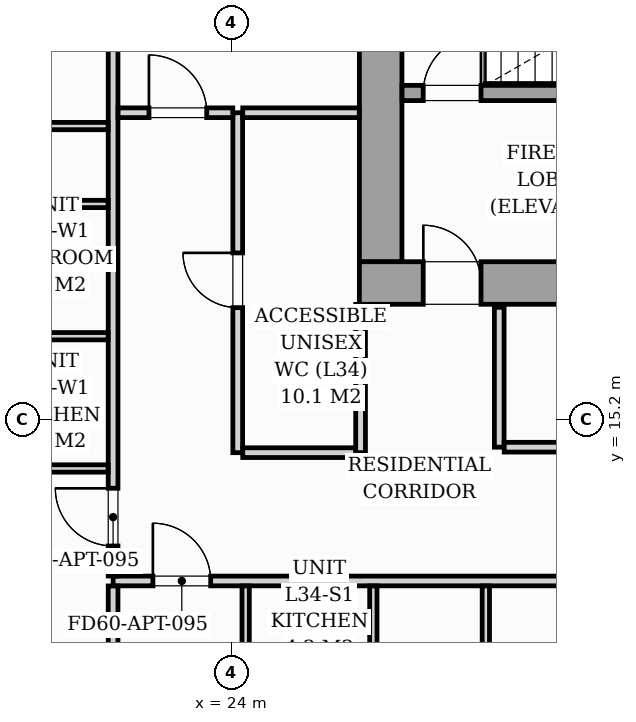
"""IFC4 building model, lengths in metres.
Left out: names, types, materials, properties, quantities, classifications, styles, units other than length and angle.
Written with IfcOpenShell. Run it as: python <this file> out.ifc"""

import sys

from ifc_helpers import new_model, si_unit, direction, frame, frame_2d, origin, origin_2d, place, context, subcontext, project, spatial, rectangle, i_section, extrude, source, transform, mapped, element, fill, save


model = new_model("IFC4")
c1 = context("Model", 3, precision=1e-05, world=origin(), true_north=direction((0.0, 1.0)))
c2 = subcontext(c1, "Body", "Model", "MODEL_VIEW")
j1 = project(units=[si_unit("LENGTHUNIT", "METRE"), si_unit("PLANEANGLEUNIT", "RADIAN")], contexts=[c1])
p1 = place(None, origin())
s1 = spatial("IfcSite", under=j1, at=p1, CompositionType="ELEMENT")
p2 = place(p1, origin())
s2 = spatial("IfcBuilding", under=s1, at=p2, CompositionType="ELEMENT")
p3 = place(p2, frame((0.0, 0.0, 119.4)))
s3 = spatial("IfcBuildingStorey", under=s2, at=p3, CompositionType="ELEMENT", Elevation=119.4)
m1 = source(origin(), c2, "Body", "SweptSolid", [
    extrude(i_section(OverallWidth=0.421, OverallDepth=0.465, WebThickness=0.045, FlangeThickness=0.073, FilletRadius=0.018, at=origin_2d()), origin(), (0.0, 0.0, 1.0), 5.196),
])
p4 = place(p3, frame((26.4, 17.4, 0.002), z_axis=(0.0, 0.0, 1.0), x_axis=(1.0, 0.0, 0.0)))
e1 = element("IfcColumn", 1, at=p4, inside=s3, PredefinedType="PILASTER", context=c2, shape_type="MappedRepresentation", body=[
    mapped(m1, transform((0.0, 0.0, 0.0), scale=1.0)),
])
p5 = place(p3, frame((26.1, 17.45, 0.0), z_axis=(0.0, 0.0, 1.0), x_axis=(1.0, 0.0, 0.0)))
e2 = element("IfcWall", 2, at=p5, inside=s3, PredefinedType="SHEAR", context=c2, shape_type="SweptSolid", body=[
    extrude(rectangle(XDim=19.8, YDim=0.7, at=frame_2d((9.9, 0.0))), origin(), (0.0, 0.0, 1.0), 5.2),
])
p6 = place(p5, frame((1.05, 0.0, 0.0)))
e3 = element("IfcOpeningElement", 3, at=p6, cuts=e2, PredefinedType="OPENING", context=c2, shape_type="SweptSolid", body=[
    extrude(rectangle(XDim=0.95, YDim=2.06, at=frame_2d((0.475, 1.03))), frame((0.0, 0.36, 0.0), z_axis=(0.0, -1.0, 0.0), x_axis=(1.0, 0.0, 0.0)), (0.0, 0.0, 1.0), 0.72),
])
p7 = place(p5, frame((9.48, 0.0, 0.0)))
e4 = element("IfcOpeningElement", 4, at=p7, cuts=e2, PredefinedType="OPENING", context=c2, shape_type="SweptSolid", body=[
    extrude(rectangle(XDim=0.9, YDim=2.06, at=frame_2d((0.45, 1.03))), frame((0.0, 0.36, 0.0), z_axis=(0.0, -1.0, 0.0), x_axis=(1.0, 0.0, 0.0)), (0.0, 0.0, 1.0), 0.72),
])
p8 = place(p5, frame((17.65, 0.0, 0.0)))
e5 = element("IfcOpeningElement", 5, at=p8, cuts=e2, PredefinedType="OPENING", context=c2, shape_type="SweptSolid", body=[
    extrude(rectangle(XDim=0.95, YDim=2.06, at=frame_2d((0.475, 1.03))), frame((0.0, 0.36, 0.0), z_axis=(0.0, -1.0, 0.0), x_axis=(1.0, 0.0, 0.0)), (0.0, 0.0, 1.0), 0.72),
])
p9 = place(p3, frame((26.45, 17.802, 0.0), z_axis=(0.0, 0.0, 1.0), x_axis=(0.0, 1.0, 0.0)))
e6 = element("IfcWall", 6, at=p9, inside=s3, PredefinedType="SHEAR", context=c2, shape_type="SweptSolid", body=[
    extrude(rectangle(XDim=5.796, YDim=0.7, at=frame_2d((2.898, 0.0))), origin(), (0.0, 0.0, 1.0), 5.2),
])
p10 = place(p3, frame((26.802, 20.575, 0.0), z_axis=(0.0, 0.0, 1.0), x_axis=(1.0, 0.0, 0.0)))
e7 = element("IfcWall", 7, at=p10, inside=s3, PredefinedType="SOLIDWALL", context=c2, shape_type="SweptSolid", body=[
    extrude(rectangle(XDim=8.148, YDim=0.25, at=frame_2d((4.074, 0.0))), origin(), (0.0, 0.0, 1.0), 5.2),
])
p11 = place(p10, frame((0.348, 0.0, 0.0)))
e8 = element("IfcOpeningElement", 8, at=p11, cuts=e7, PredefinedType="OPENING", context=c2, shape_type="SweptSolid", body=[
    extrude(rectangle(XDim=0.95, YDim=2.06, at=frame_2d((0.475, 1.03))), frame((0.0, 0.135, 0.0), z_axis=(0.0, -1.0, 0.0), x_axis=(1.0, 0.0, 0.0)), (0.0, 0.0, 1.0), 0.27),
])
p12 = place(p3, frame((28.4, 14.75, 0.0), z_axis=(0.0, 0.0, 1.0), x_axis=(0.0, 1.0, 0.0)))
e9 = element("IfcWall", 9, at=p12, inside=s3, PredefinedType="PARTITIONING", context=c2, shape_type="SweptSolid", body=[
    extrude(rectangle(XDim=2.3, YDim=0.16, at=frame_2d((1.15, 0.0))), origin(), (0.0, 0.0, 1.0), 4.78),
])
p13 = place(p3, frame((28.482, 14.75, 0.0), z_axis=(0.0, 0.0, 1.0), x_axis=(1.0, 0.0, 0.0)))
e10 = element("IfcWall", 10, at=p13, inside=s3, PredefinedType="PARTITIONING", context=c2, shape_type="SweptSolid", body=[
    extrude(rectangle(XDim=4.516, YDim=0.16, at=frame_2d((2.258, 0.0))), origin(), (0.0, 0.0, 1.0), 4.78),
])
p14 = place(p13, frame((1.868, 0.0, 0.0)))
e11 = element("IfcOpeningElement", 11, at=p14, cuts=e10, PredefinedType="OPENING", context=c2, shape_type="SweptSolid", body=[
    extrude(rectangle(XDim=0.8, YDim=2.05, at=frame_2d((0.4, 1.025))), frame((0.0, 0.09, 0.0), z_axis=(0.0, -1.0, 0.0), x_axis=(1.0, 0.0, 0.0)), (0.0, 0.0, 1.0), 0.18),
])
p15 = place(p3, frame((22.05, 12.55, 0.0), z_axis=(0.0, 0.0, 1.0), x_axis=(1.0, 0.0, 0.0)))
e12 = element("IfcWall", 12, at=p15, inside=s3, PredefinedType="PARTITIONING", context=c2, shape_type="SweptSolid", body=[
    extrude(rectangle(XDim=23.83, YDim=0.16, at=frame_2d((11.915, 0.0))), origin(), (0.0, 0.0, 1.0), 4.78),
])
p16 = place(p15, frame((0.655, 0.0, 0.0)))
e13 = element("IfcOpeningElement", 13, at=p16, cuts=e12, PredefinedType="OPENING", context=c2, shape_type="SweptSolid", body=[
    extrude(rectangle(XDim=0.95, YDim=2.06, at=frame_2d((0.475, 1.03))), frame((0.0, 0.09, 0.0), z_axis=(0.0, -1.0, 0.0), x_axis=(1.0, 0.0, 0.0)), (0.0, 0.0, 1.0), 0.18),
])
p17 = place(p15, frame((12.04, 0.0, 0.0)))
e14 = element("IfcOpeningElement", 14, at=p17, cuts=e12, PredefinedType="OPENING", context=c2, shape_type="SweptSolid", body=[
    extrude(rectangle(XDim=0.95, YDim=2.06, at=frame_2d((0.475, 1.03))), frame((0.0, 0.09, 0.0), z_axis=(0.0, -1.0, 0.0), x_axis=(1.0, 0.0, 0.0)), (0.0, 0.0, 1.0), 0.18),
])
p18 = place(p3, frame((22.05, 8.253, 0.0), z_axis=(0.0, 0.0, 1.0), x_axis=(0.0, 1.0, 0.0)))
e15 = element("IfcWall", 15, at=p18, inside=s3, PredefinedType="PARTITIONING", context=c2, shape_type="SweptSolid", body=[
    extrude(rectangle(XDim=4.215, YDim=0.16, at=frame_2d((2.107, 0.0))), origin(), (0.0, 0.0, 1.0), 4.78),
])
p19 = place(p3, frame((22.05, 12.632, 0.0), z_axis=(0.0, 0.0, 1.0), x_axis=(0.0, 1.0, 0.0)))
e16 = element("IfcWall", 16, at=p19, inside=s3, PredefinedType="PARTITIONING", context=c2, shape_type="SweptSolid", body=[
    extrude(rectangle(XDim=14.785, YDim=0.16, at=frame_2d((7.393, 0.0))), origin(), (0.0, 0.0, 1.0), 4.78),
])
p20 = place(p19, frame((0.493, 0.0, 0.0)))
e17 = element("IfcOpeningElement", 17, at=p20, cuts=e16, PredefinedType="OPENING", context=c2, shape_type="SweptSolid", body=[
    extrude(rectangle(XDim=0.95, YDim=2.06, at=frame_2d((0.475, 1.03))), frame((0.0, 0.09, 0.0), z_axis=(0.0, -1.0, 0.0), x_axis=(1.0, 0.0, 0.0)), (0.0, 0.0, 1.0), 0.18),
])
p21 = place(p3, frame((28.18, 7.48, 0.0), z_axis=(0.0, 0.0, 1.0), x_axis=(0.0, 1.0, 0.0)))
e18 = element("IfcWall", 18, at=p21, inside=s3, PredefinedType="PARTITIONING", context=c2, shape_type="SweptSolid", body=[
    extrude(rectangle(XDim=4.988, YDim=0.12, at=frame_2d((2.494, 0.0))), origin(), (0.0, 0.0, 1.0), 4.78),
])
p22 = place(p21, frame((1.835, 0.0, 0.0)))
e19 = element("IfcOpeningElement", 19, at=p22, cuts=e18, PredefinedType="OPENING", context=c2, shape_type="SweptSolid", body=[
    extrude(rectangle(XDim=0.9, YDim=2.05, at=frame_2d((0.45, 1.025))), frame((0.0, 0.07, 0.0), z_axis=(0.0, -1.0, 0.0), x_axis=(1.0, 0.0, 0.0)), (0.0, 0.0, 1.0), 0.14),
])
for number, where, z_axis, x_axis in (
    (20, (26.33, 10.362, 0.0), (0.0, 0.0, 1.0), (0.0, 1.0, 0.0)),
    (21, (24.23, 10.362, 0.0), (0.0, 0.0, 1.0), (0.0, 1.0, 0.0)),
):
    element("IfcWall", number, at=place(p3, frame(where, z_axis=z_axis, x_axis=x_axis)), inside=s3, PredefinedType="PARTITIONING", context=c2, shape_type="SweptSolid", body=[
        extrude(rectangle(XDim=2.106, YDim=0.12, at=frame_2d((1.053, 0.0))), origin(), (0.0, 0.0, 1.0), 4.78),
    ])
for number, where, z_axis, x_axis in (
    (22, (19.712, 16.575, 0.0), (0.0, 0.0, 1.0), (1.0, 0.0, 0.0)),
    (23, (19.712, 14.4, 0.0), (0.0, 0.0, 1.0), (1.0, 0.0, 0.0)),
    (24, (19.712, 18.75, 0.0), (0.0, 0.0, 1.0), (1.0, 0.0, 0.0)),
):
    element("IfcWall", number, at=place(p3, frame(where, z_axis=z_axis, x_axis=x_axis)), inside=s3, PredefinedType="PARTITIONING", context=c2, shape_type="SweptSolid", body=[
        extrude(rectangle(XDim=2.256, YDim=0.12, at=frame_2d((1.128, 0.0))), origin(), (0.0, 0.0, 1.0), 4.78),
    ])
p23 = place(p3, frame((6.45, 20.031, 0.0), z_axis=(0.0, 0.0, 1.0), x_axis=(1.0, 0.0, 0.0)))
e25 = element("IfcWall", 25, at=p23, inside=s3, PredefinedType="PARTITIONING", context=c2, shape_type="SweptSolid", body=[
    extrude(rectangle(XDim=15.518, YDim=0.12, at=frame_2d((7.759, 0.0))), origin(), (0.0, 0.0, 1.0), 4.78),
])
p24 = place(p23, frame((9.396, 0.0, 0.0)))
e26 = element("IfcOpeningElement", 26, at=p24, cuts=e25, PredefinedType="OPENING", context=c2, shape_type="SweptSolid", body=[
    extrude(rectangle(XDim=0.85, YDim=2.05, at=frame_2d((0.425, 1.025))), frame((0.0, 0.07, 0.0), z_axis=(0.0, -1.0, 0.0), x_axis=(1.0, 0.0, 0.0)), (0.0, 0.0, 1.0), 0.14),
])
p25 = place(p3, frame((24.1, 14.66, 0.0), z_axis=(0.0, 0.0, 1.0), x_axis=(0.0, 1.0, 0.0)))
e27 = element("IfcWall", 27, at=p25, inside=s3, PredefinedType="PARTITIONING", context=c2, shape_type="SweptSolid", body=[
    extrude(rectangle(XDim=5.59, YDim=0.16, at=frame_2d((2.795, 0.0))), origin(), (0.0, 0.0, 1.0), 4.78),
])
p26 = place(p25, frame((2.385, 0.0, 0.0)))
e28 = element("IfcOpeningElement", 28, at=p26, cuts=e27, PredefinedType="OPENING", context=c2, shape_type="SweptSolid", body=[
    extrude(rectangle(XDim=0.9, YDim=2.05, at=frame_2d((0.45, 1.025))), frame((0.0, 0.09, 0.0), z_axis=(0.0, -1.0, 0.0), x_axis=(1.0, 0.0, 0.0)), (0.0, 0.0, 1.0), 0.18),
])
p27 = place(p3, frame((22.132, 20.25, 0.0), z_axis=(0.0, 0.0, 1.0), x_axis=(1.0, 0.0, 0.0)))
e29 = element("IfcWall", 29, at=p27, inside=s3, PredefinedType="PARTITIONING", context=c2, shape_type="SweptSolid", body=[
    extrude(rectangle(XDim=1.886, YDim=0.16, at=frame_2d((0.943, 0.0))), origin(), (0.0, 0.0, 1.0), 4.78),
])
p28 = place(p27, frame((0.508, 0.0, 0.0)))
e30 = element("IfcOpeningElement", 30, at=p28, cuts=e29, PredefinedType="OPENING", context=c2, shape_type="SweptSolid", body=[
    extrude(rectangle(XDim=0.95, YDim=2.06, at=frame_2d((0.475, 1.03))), frame((0.0, 0.09, 0.0), z_axis=(0.0, -1.0, 0.0), x_axis=(1.0, 0.0, 0.0)), (0.0, 0.0, 1.0), 0.18),
])
p29 = place(p3, frame((24.182, 20.25, 0.0), z_axis=(0.0, 0.0, 1.0), x_axis=(1.0, 0.0, 0.0)))
e31 = element("IfcWall", 31, at=p29, inside=s3, PredefinedType="PARTITIONING", context=c2, shape_type="SweptSolid", body=[
    extrude(rectangle(XDim=1.916, YDim=0.16, at=frame_2d((0.958, 0.0))), origin(), (0.0, 0.0, 1.0), 4.78),
])
p30 = place(p3, frame((26.12, 14.66, 0.0), z_axis=(0.0, 0.0, 1.0), x_axis=(0.0, 1.0, 0.0)))
e32 = element("IfcWall", 32, at=p30, inside=s3, PredefinedType="PARTITIONING", context=c2, shape_type="SweptSolid", body=[
    extrude(rectangle(XDim=2.438, YDim=0.16, at=frame_2d((1.219, 0.0))), origin(), (0.0, 0.0, 1.0), 4.78),
])
p31 = place(p3, frame((24.182, 14.66, 0.0), z_axis=(0.0, 0.0, 1.0), x_axis=(1.0, 0.0, 0.0)))
e33 = element("IfcWall", 33, at=p31, inside=s3, PredefinedType="PARTITIONING", context=c2, shape_type="SweptSolid", body=[
    extrude(rectangle(XDim=1.856, YDim=0.16, at=frame_2d((0.928, 0.0))), origin(), (0.0, 0.0, 1.0), 4.78),
])
m2 = source(origin(), c2, "Body", "SweptSolid", [
    extrude(rectangle(XDim=0.95, YDim=2.06, at=frame_2d((0.475, 1.03))), frame((0.0, 0.025, 0.0), z_axis=(0.0, -1.0, 0.0), x_axis=(1.0, 0.0, 0.0)), (0.0, 0.0, 1.0), 0.05),
])
p32 = place(p6, origin())
e34 = element("IfcDoor", 34, at=p32, inside=s3, OperationType="SINGLE_SWING_LEFT", PredefinedType="DOOR", context=c2, shape_type="MappedRepresentation", body=[
    mapped(m2, transform((0.0, 0.0, 0.0), scale=1.0)),
])
fill(e3, e34)
p33 = place(p11, origin())
e35 = element("IfcDoor", 35, at=p33, inside=s3, OperationType="SINGLE_SWING_RIGHT", PredefinedType="DOOR", context=c2, shape_type="MappedRepresentation", body=[
    mapped(m2, transform((0.0, 0.0, 0.0), scale=1.0)),
])
fill(e8, e35)
m3 = source(origin(), c2, "Body", "SweptSolid", [
    extrude(rectangle(XDim=0.95, YDim=2.06, at=frame_2d((0.475, 1.03))), frame((0.0, 0.025, 0.0), z_axis=(0.0, -1.0, 0.0), x_axis=(1.0, 0.0, 0.0)), (0.0, 0.0, 1.0), 0.05),
])
p34 = place(p16, origin())
e36 = element("IfcDoor", 36, at=p34, inside=s3, OperationType="SINGLE_SWING_LEFT", PredefinedType="DOOR", context=c2, shape_type="MappedRepresentation", body=[
    mapped(m3, transform((0.0, 0.0, 0.0), scale=1.0)),
])
fill(e13, e36)
p35 = place(p20, origin())
e37 = element("IfcDoor", 37, at=p35, inside=s3, OperationType="SINGLE_SWING_RIGHT", PredefinedType="DOOR", context=c2, shape_type="MappedRepresentation", body=[
    mapped(m3, transform((0.0, 0.0, 0.0), scale=1.0)),
])
fill(e17, e37)
m4 = source(origin(), c2, "Body", "SweptSolid", [
    extrude(rectangle(XDim=0.9, YDim=2.05, at=frame_2d((0.45, 1.025))), frame((0.0, 0.025, 0.0), z_axis=(0.0, -1.0, 0.0), x_axis=(1.0, 0.0, 0.0)), (0.0, 0.0, 1.0), 0.05),
])
p36 = place(p26, origin())
e38 = element("IfcDoor", 38, at=p36, inside=s3, OperationType="SINGLE_SWING_RIGHT", PredefinedType="DOOR", context=c2, shape_type="MappedRepresentation", body=[
    mapped(m4, transform((0.0, 0.0, 0.0), scale=1.0)),
])
fill(e28, e38)
p37 = place(p28, origin())
e39 = element("IfcDoor", 39, at=p37, inside=s3, OperationType="SINGLE_SWING_LEFT", PredefinedType="DOOR", context=c2, shape_type="MappedRepresentation", body=[
    mapped(m3, transform((0.0, 0.0, 0.0), scale=1.0)),
])
fill(e30, e39)
save(model, sys.argv[1])
